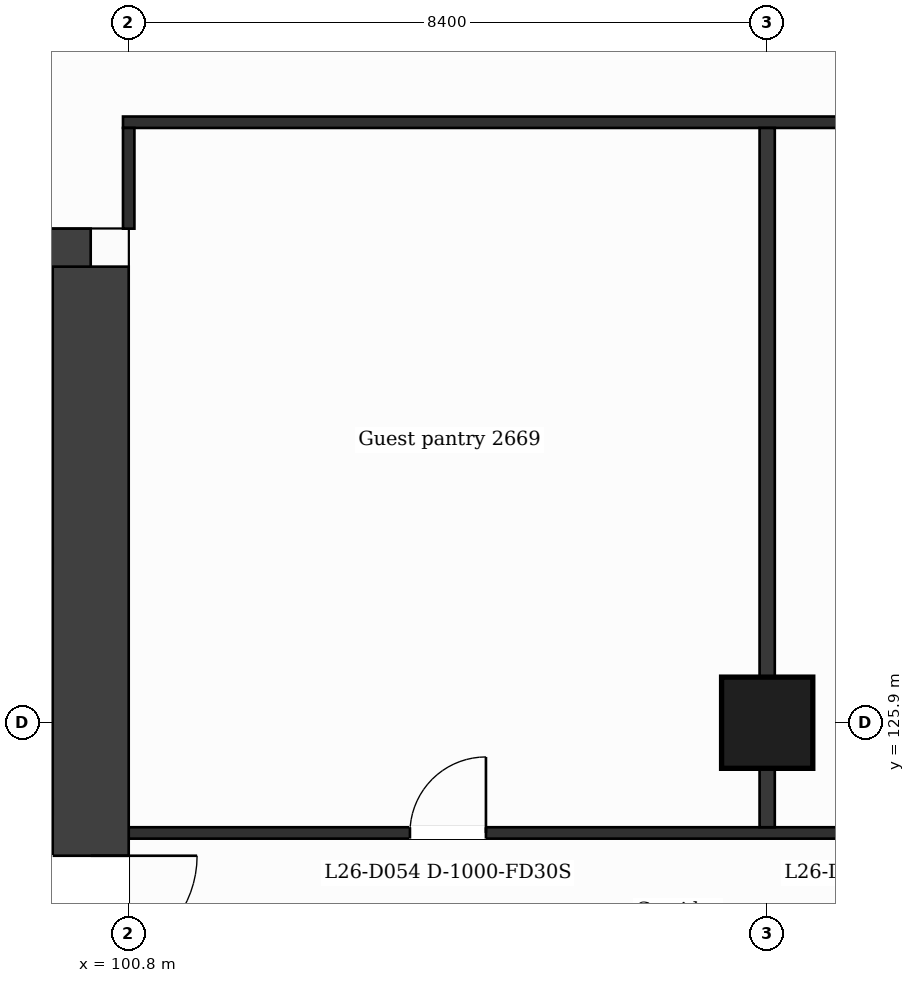
"""IFC4 building model, lengths in metres.
Left out: names, types, materials, properties, quantities, classifications, styles, units other than length and angle.
Written with IfcOpenShell. Run it as: python <this file> out.ifc"""

import sys

from ifc_helpers import new_model, si_unit, direction, frame, frame_2d, origin, origin_2d, place, context, subcontext, project, spatial, rectangle, extrude, element, fill, save


model = new_model("IFC4")
c1 = context("Model", 3, precision=1e-05, world=origin(), true_north=direction((0.0, 1.0)))
c2 = subcontext(c1, "Body", "Model", "MODEL_VIEW")
j1 = project(units=[si_unit("LENGTHUNIT", "METRE"), si_unit("PLANEANGLEUNIT", "RADIAN")], contexts=[c1])
p1 = place(None, origin())
s1 = spatial("IfcSite", under=j1, at=p1, CompositionType="ELEMENT")
p2 = place(p1, origin())
s2 = spatial("IfcBuilding", under=s1, at=p2, CompositionType="ELEMENT")
p3 = place(p2, frame((0.0, 0.0, 113.2)))
s3 = spatial("IfcBuildingStorey", under=s2, at=p3, CompositionType="ELEMENT", Elevation=113.2)
p4 = place(p3, frame((89.068, 131.9, 0.0), z_axis=(0.0, 0.0, 1.0), x_axis=(1.0, 0.0, 0.0)))
e1 = element("IfcWall", 1, at=p4, inside=s3, PredefinedType="SHEAR", context=c2, shape_type="SweptSolid", body=[
    extrude(rectangle(XDim=11.232, YDim=1.0, at=frame_2d((5.616, 0.0))), origin(), (0.0, 0.0, 1.0), 3.7),
])
p5 = place(p4, frame((6.646, 0.0, 0.0)))
e2 = element("IfcOpeningElement", 2, at=p5, cuts=e1, PredefinedType="OPENING", context=c2, shape_type="SweptSolid", body=[
    extrude(rectangle(XDim=1.2, YDim=2.1, at=frame_2d((0.6, 1.05))), frame((0.0, 0.51, 0.0), z_axis=(0.0, -1.0, 0.0), x_axis=(1.0, 0.0, 0.0)), (0.0, 0.0, 1.0), 1.02),
])
p6 = place(p3, frame((100.3, 131.9, 0.0), z_axis=(0.0, 0.0, 1.0), x_axis=(0.0, -1.0, 0.0)))
e3 = element("IfcWall", 3, at=p6, inside=s3, PredefinedType="SHEAR", context=c2, shape_type="SweptSolid", body=[
    extrude(rectangle(XDim=21.0, YDim=1.0, at=frame_2d((10.5, 0.0))), origin(), (0.0, 0.0, 1.0), 3.7),
])
p7 = place(p6, frame((7.75, 0.0, 0.0)))
e4 = element("IfcOpeningElement", 4, at=p7, cuts=e3, PredefinedType="OPENING", context=c2, shape_type="SweptSolid", body=[
    extrude(rectangle(XDim=1.4, YDim=2.1, at=frame_2d((0.7, 1.05))), frame((0.0, 0.51, 0.0), z_axis=(0.0, -1.0, 0.0), x_axis=(1.0, 0.0, 0.0)), (0.0, 0.0, 1.0), 1.02),
])
p8 = place(p3, frame((109.2, 125.9, 0.0), z_axis=(0.0, 0.0, 1.0), x_axis=(1.0, 0.0, 0.0)))
e5 = element("IfcColumn", 5, at=p8, inside=s3, PredefinedType="COLUMN", context=c2, shape_type="SweptSolid", body=[
    extrude(rectangle(XDim=1.2, YDim=1.2, at=origin_2d()), origin(), (0.0, 0.0, 1.0), 3.7),
])
p9 = place(p3, frame((100.8, 124.45, 0.0), z_axis=(0.0, 0.0, 1.0), x_axis=(1.0, 0.0, 0.0)))
e6 = element("IfcWall", 6, at=p9, inside=s3, PredefinedType="PARTITIONING", context=c2, shape_type="SweptSolid", body=[
    extrude(rectangle(XDim=25.2, YDim=0.15, at=frame_2d((12.6, 0.0))), origin(), (0.0, 0.0, 1.0), 3.38),
])
p10 = place(p9, frame((3.7, 0.0, 0.0)))
e7 = element("IfcOpeningElement", 7, at=p10, cuts=e6, PredefinedType="OPENING", context=c2, shape_type="SweptSolid", body=[
    extrude(rectangle(XDim=1.0, YDim=2.1, at=frame_2d((0.5, 1.05))), frame((0.0, 0.085, 0.0), z_axis=(0.0, -1.0, 0.0), x_axis=(1.0, 0.0, 0.0)), (0.0, 0.0, 1.0), 0.17),
])
p11 = place(p9, frame((9.75, 0.0, 0.0)))
e8 = element("IfcOpeningElement", 8, at=p11, cuts=e6, PredefinedType="OPENING", context=c2, shape_type="SweptSolid", body=[
    extrude(rectangle(XDim=1.0, YDim=2.1, at=frame_2d((0.5, 1.05))), frame((0.0, 0.085, 0.0), z_axis=(0.0, -1.0, 0.0), x_axis=(1.0, 0.0, 0.0)), (0.0, 0.0, 1.0), 0.17),
])
p12 = place(p9, frame((13.575, 0.0, 0.0)))
e9 = element("IfcOpeningElement", 9, at=p12, cuts=e6, PredefinedType="OPENING", context=c2, shape_type="SweptSolid", body=[
    extrude(rectangle(XDim=1.0, YDim=2.1, at=frame_2d((0.5, 1.05))), frame((0.0, 0.085, 0.0), z_axis=(0.0, -1.0, 0.0), x_axis=(1.0, 0.0, 0.0)), (0.0, 0.0, 1.0), 0.17),
])
p13 = place(p9, frame((18.125, 0.0, 0.0)))
e10 = element("IfcOpeningElement", 10, at=p13, cuts=e6, PredefinedType="OPENING", context=c2, shape_type="SweptSolid", body=[
    extrude(rectangle(XDim=1.0, YDim=2.1, at=frame_2d((0.5, 1.05))), frame((0.0, 0.085, 0.0), z_axis=(0.0, -1.0, 0.0), x_axis=(1.0, 0.0, 0.0)), (0.0, 0.0, 1.0), 0.17),
])
p14 = place(p9, frame((22.35, 0.0, 0.0)))
e11 = element("IfcOpeningElement", 11, at=p14, cuts=e6, PredefinedType="OPENING", context=c2, shape_type="SweptSolid", body=[
    extrude(rectangle(XDim=1.0, YDim=2.1, at=frame_2d((0.5, 1.05))), frame((0.0, 0.085, 0.0), z_axis=(0.0, -1.0, 0.0), x_axis=(1.0, 0.0, 0.0)), (0.0, 0.0, 1.0), 0.17),
])
p15 = place(p3, frame((100.725, 133.8, 0.0), z_axis=(0.0, 0.0, 1.0), x_axis=(1.0, 0.0, 0.0)))
e12 = element("IfcWall", 12, at=p15, inside=s3, PredefinedType="PARTITIONING", context=c2, shape_type="SweptSolid", body=[
    extrude(rectangle(XDim=25.35, YDim=0.15, at=frame_2d((12.675, 0.0))), origin(), (0.0, 0.0, 1.0), 3.38),
])
p16 = place(p15, frame((18.225, 0.0, 0.0)))
e13 = element("IfcOpeningElement", 13, at=p16, cuts=e12, PredefinedType="OPENING", context=c2, shape_type="SweptSolid", body=[
    extrude(rectangle(XDim=1.0, YDim=2.1, at=frame_2d((0.5, 1.05))), frame((0.0, 0.085, 0.0), z_axis=(0.0, -1.0, 0.0), x_axis=(1.0, 0.0, 0.0)), (0.0, 0.0, 1.0), 0.17),
])
p17 = place(p3, frame((100.8, 132.4, 0.0), z_axis=(0.0, 0.0, 1.0), x_axis=(0.0, 1.0, 0.0)))
e14 = element("IfcWall", 14, at=p17, inside=s3, PredefinedType="PARTITIONING", context=c2, shape_type="SweptSolid", body=[
    extrude(rectangle(XDim=1.325, YDim=0.15, at=frame_2d((0.663, 0.0))), origin(), (0.0, 0.0, 1.0), 3.38),
])
p18 = place(p3, frame((109.2, 124.525, 0.0), z_axis=(0.0, 0.0, 1.0), x_axis=(0.0, 1.0, 0.0)))
e15 = element("IfcWall", 15, at=p18, inside=s3, PredefinedType="PARTITIONING", context=c2, shape_type="SweptSolid", body=[
    extrude(rectangle(XDim=9.2, YDim=0.2, at=frame_2d((4.6, 0.0))), origin(), (0.0, 0.0, 1.0), 3.38),
])
p19 = place(p10, origin())
e16 = element("IfcDoor", 16, at=p19, inside=s3, OperationType="SINGLE_SWING_RIGHT", PredefinedType="DOOR", context=c2, shape_type="SweptSolid", body=[
    extrude(rectangle(XDim=1.0, YDim=2.1, at=frame_2d((0.5, 1.05))), frame((0.0, 0.025, 0.0), z_axis=(0.0, -1.0, 0.0), x_axis=(1.0, 0.0, 0.0)), (0.0, 0.0, 1.0), 0.05),
])
fill(e7, e16)
p20 = place(p7, origin())
e17 = element("IfcDoor", 17, at=p20, inside=s3, OperationType="SINGLE_SWING_LEFT", PredefinedType="DOOR", context=c2, shape_type="SweptSolid", body=[
    extrude(rectangle(XDim=1.4, YDim=2.1, at=frame_2d((0.7, 1.05))), frame((0.0, 0.025, 0.0), z_axis=(0.0, -1.0, 0.0), x_axis=(1.0, 0.0, 0.0)), (0.0, 0.0, 1.0), 0.05),
])
fill(e4, e17)
save(model, sys.argv[1])
